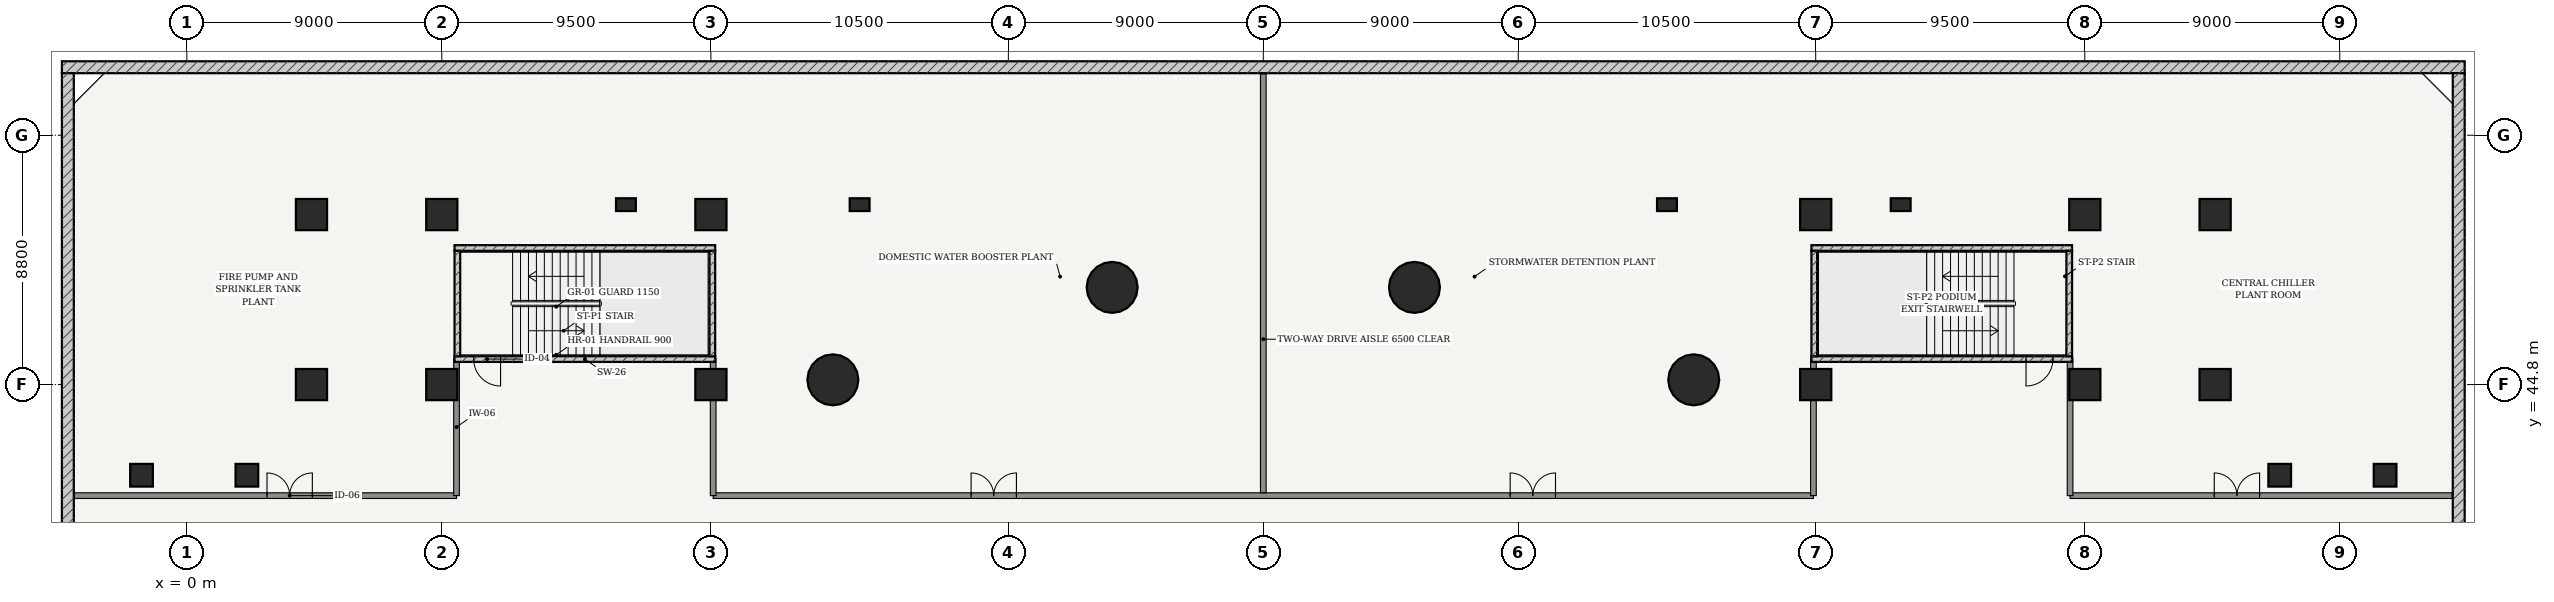
"""IFC4 building model, lengths in metres.
Left out: names, types, materials, properties, quantities, classifications, styles, units other than length and angle.
Written with IfcOpenShell. Run it as: python <this file> out.ifc"""

import sys

from ifc_helpers import new_model, si_unit, direction, frame, frame_2d, origin, origin_2d, place, context, subcontext, project, spatial, rectangle, hollow_circle, extrude, source, transform, mapped, element, fill, save


model = new_model("IFC4")
c1 = context("Model", 3, precision=1e-05, world=origin(), true_north=direction((-0.2419218956, 0.970295726276)))
c2 = subcontext(c1, "Body", "Model", "MODEL_VIEW")
j1 = project(units=[si_unit("LENGTHUNIT", "METRE"), si_unit("PLANEANGLEUNIT", "RADIAN")], contexts=[c1])
p1 = place(None, origin())
s1 = spatial("IfcSite", under=j1, at=p1, CompositionType="ELEMENT")
p2 = place(p1, origin())
s2 = spatial("IfcBuilding", under=s1, at=p2, CompositionType="ELEMENT")
p3 = place(p2, frame((0.0, 0.0, -8.4)))
s3 = spatial("IfcBuildingStorey", under=s2, at=p3, CompositionType="ELEMENT", Elevation=-8.4)
p4 = place(p3, frame((9.45, 45.7, 0.0), z_axis=(0.0, 0.0, 1.0), x_axis=(1.0, 0.0, 0.0)))
e1 = element("IfcWall", 1, at=p4, inside=s3, PredefinedType="SOLIDWALL", context=c2, shape_type="SweptSolid", body=[
    extrude(rectangle(XDim=9.2, YDim=0.2, at=frame_2d((4.6, 0.0))), origin(), (0.0, 0.0, 1.0), 3.88),
])
p5 = place(p4, frame((0.675, 0.0, 0.0)))
e2 = element("IfcOpeningElement", 2, at=p5, cuts=e1, PredefinedType="OPENING", context=c2, shape_type="SweptSolid", body=[
    extrude(rectangle(XDim=0.95, YDim=2.15, at=frame_2d((0.475, 1.075))), frame((0.0, 0.11, 0.0), z_axis=(0.0, -1.0, 0.0), x_axis=(1.0, 0.0, 0.0)), (0.0, 0.0, 1.0), 0.22),
])
p6 = place(p3, frame((9.45, 49.62, 0.0), z_axis=(0.0, 0.0, 1.0), x_axis=(1.0, 0.0, 0.0)))
e3 = element("IfcWall", 3, at=p6, inside=s3, PredefinedType="SOLIDWALL", context=c2, shape_type="SweptSolid", body=[
    extrude(rectangle(XDim=9.2, YDim=0.2, at=frame_2d((4.6, 0.0))), origin(), (0.0, 0.0, 1.0), 3.88),
])
for number, where, z_axis, x_axis in (
    (4, (9.55, 45.8, 0.0), (0.0, 0.0, 1.0), (0.0, 1.0, 0.0)),
    (5, (18.55, 45.8, 0.0), (0.0, 0.0, 1.0), (0.0, 1.0, 0.0)),
):
    element("IfcWall", number, at=place(p3, frame(where, z_axis=z_axis, x_axis=x_axis)), inside=s3, PredefinedType="SOLIDWALL", context=c2, shape_type="SweptSolid", body=[
        extrude(rectangle(XDim=3.72, YDim=0.2, at=frame_2d((1.86, 0.0))), origin(), (0.0, 0.0, 1.0), 3.88),
    ])
p7 = place(p3, frame((57.35, 45.7, 0.0), z_axis=(0.0, 0.0, 1.0), x_axis=(1.0, 0.0, 0.0)))
e6 = element("IfcWall", 6, at=p7, inside=s3, PredefinedType="SOLIDWALL", context=c2, shape_type="SweptSolid", body=[
    extrude(rectangle(XDim=9.2, YDim=0.2, at=frame_2d((4.6, 0.0))), origin(), (0.0, 0.0, 1.0), 3.88),
])
p8 = place(p7, frame((7.575, 0.0, 0.0)))
e7 = element("IfcOpeningElement", 7, at=p8, cuts=e6, PredefinedType="OPENING", context=c2, shape_type="SweptSolid", body=[
    extrude(rectangle(XDim=0.95, YDim=2.15, at=frame_2d((0.475, 1.075))), frame((0.0, 0.11, 0.0), z_axis=(0.0, -1.0, 0.0), x_axis=(1.0, 0.0, 0.0)), (0.0, 0.0, 1.0), 0.22),
])
p9 = place(p3, frame((57.35, 49.62, 0.0), z_axis=(0.0, 0.0, 1.0), x_axis=(1.0, 0.0, 0.0)))
e8 = element("IfcWall", 8, at=p9, inside=s3, PredefinedType="SOLIDWALL", context=c2, shape_type="SweptSolid", body=[
    extrude(rectangle(XDim=9.2, YDim=0.2, at=frame_2d((4.6, 0.0))), origin(), (0.0, 0.0, 1.0), 3.88),
])
for number, where, z_axis, x_axis in (
    (9, (57.45, 45.8, 0.0), (0.0, 0.0, 1.0), (0.0, 1.0, 0.0)),
    (10, (66.45, 45.8, 0.0), (0.0, 0.0, 1.0), (0.0, 1.0, 0.0)),
):
    element("IfcWall", number, at=place(p3, frame(where, z_axis=z_axis, x_axis=x_axis)), inside=s3, PredefinedType="SOLIDWALL", context=c2, shape_type="SweptSolid", body=[
        extrude(rectangle(XDim=3.72, YDim=0.2, at=frame_2d((1.86, 0.0))), origin(), (0.0, 0.0, 1.0), 3.88),
    ])
p10 = place(p3, frame((-4.41, 56.0, 0.0), z_axis=(0.0, 0.0, 1.0), x_axis=(1.0, 0.0, 0.0)))
e11 = element("IfcWall", 11, at=p10, inside=s3, PredefinedType="SOLIDWALL", context=c2, shape_type="SweptSolid", body=[
    extrude(rectangle(XDim=84.82, YDim=0.42, at=frame_2d((42.41, 0.0))), origin(), (0.0, 0.0, 1.0), 3.88),
])
for number, where, z_axis, x_axis in (
    (12, (-4.2, -2.19, 0.0), (0.0, 0.0, 1.0), (0.0, 1.0, 0.0)),
    (13, (80.2, -2.19, 0.0), (0.0, 0.0, 1.0), (0.0, 1.0, 0.0)),
):
    element("IfcWall", number, at=place(p3, frame(where, z_axis=z_axis, x_axis=x_axis)), inside=s3, PredefinedType="SOLIDWALL", context=c2, shape_type="SweptSolid", body=[
        extrude(rectangle(XDim=57.98, YDim=0.42, at=frame_2d((28.99, 0.0))), origin(), (0.0, 0.0, 1.0), 3.88),
    ])
for number, where, z_axis, x_axis in (
    (14, (53.195, 44.968, 0.0), (0.0, 0.0, 1.0), (1.0, 0.0, 0.0)),
    (15, (43.336, 48.23, 0.0), (0.0, 0.0, 1.0), (1.0, 0.0, 0.0)),
    (16, (32.664, 48.23, 0.0), (0.0, 0.0, 1.0), (1.0, 0.0, 0.0)),
    (17, (22.805, 44.968, 0.0), (0.0, 0.0, 1.0), (1.0, 0.0, 0.0)),
):
    element("IfcColumn", number, at=place(p3, frame(where, z_axis=z_axis, x_axis=x_axis)), inside=s3, PredefinedType="COLUMN", context=c2, shape_type="SweptSolid", body=[
        extrude(hollow_circle(Radius=0.9, WallThickness=0.055, at=origin_2d()), origin(), (0.0, 0.0, 1.0), 4.2),
    ])
for number, where, z_axis, x_axis in (
    (18, (4.4, 44.8, 0.0), (0.0, 0.0, 1.0), (1.0, 0.0, 0.0)),
    (19, (4.4, 50.8, 0.0), (0.0, 0.0, 1.0), (1.0, 0.0, 0.0)),
    (20, (9.0, 44.8, 0.0), (0.0, 0.0, 1.0), (1.0, 0.0, 0.0)),
    (21, (9.0, 50.8, 0.0), (0.0, 0.0, 1.0), (1.0, 0.0, 0.0)),
    (22, (18.5, 44.8, 0.0), (0.0, 0.0, 1.0), (1.0, 0.0, 0.0)),
    (23, (18.5, 50.8, 0.0), (0.0, 0.0, 1.0), (1.0, 0.0, 0.0)),
    (24, (57.5, 44.8, 0.0), (0.0, 0.0, 1.0), (1.0, 0.0, 0.0)),
    (25, (57.5, 50.8, 0.0), (0.0, 0.0, 1.0), (1.0, 0.0, 0.0)),
    (26, (67.0, 44.8, 0.0), (0.0, 0.0, 1.0), (1.0, 0.0, 0.0)),
    (27, (67.0, 50.8, 0.0), (0.0, 0.0, 1.0), (1.0, 0.0, 0.0)),
    (28, (71.6, 44.8, 0.0), (0.0, 0.0, 1.0), (1.0, 0.0, 0.0)),
    (29, (71.6, 50.8, 0.0), (0.0, 0.0, 1.0), (1.0, 0.0, 0.0)),
):
    element("IfcColumn", number, at=place(p3, frame(where, z_axis=z_axis, x_axis=x_axis)), inside=s3, PredefinedType="COLUMN", context=c2, shape_type="SweptSolid", body=[
        extrude(rectangle(XDim=1.1, YDim=1.1, at=origin_2d()), origin(), (0.0, 0.0, 1.0), 4.2),
    ])
for number, where, z_axis, x_axis in (
    (30, (15.5, 51.15, 0.0), (0.0, 0.0, 1.0), (1.0, 0.0, 0.0)),
    (31, (23.75, 51.15, 0.0), (0.0, 0.0, 1.0), (1.0, 0.0, 0.0)),
    (32, (52.25, 51.15, 0.0), (0.0, 0.0, 1.0), (1.0, 0.0, 0.0)),
    (33, (60.5, 51.15, 0.0), (0.0, 0.0, 1.0), (1.0, 0.0, 0.0)),
):
    element("IfcColumn", number, at=place(p3, frame(where, z_axis=z_axis, x_axis=x_axis)), inside=s3, PredefinedType="PILASTER", context=c2, shape_type="SweptSolid", body=[
        extrude(rectangle(XDim=0.7, YDim=0.45, at=origin_2d()), origin(), (0.0, 0.0, 1.0), 4.2),
    ])
for number, where, z_axis, x_axis in (
    (34, (-1.6, 41.6, 0.0), (0.0, 0.0, 1.0), (1.0, 0.0, 0.0)),
    (35, (2.12, 41.6, 0.0), (0.0, 0.0, 1.0), (1.0, 0.0, 0.0)),
    (36, (73.88, 41.6, 0.0), (0.0, 0.0, 1.0), (1.0, 0.0, 0.0)),
    (37, (77.6, 41.6, 0.0), (0.0, 0.0, 1.0), (1.0, 0.0, 0.0)),
):
    element("IfcColumn", number, at=place(p3, frame(where, z_axis=z_axis, x_axis=x_axis)), inside=s3, PredefinedType="COLUMN", context=c2, shape_type="SweptSolid", body=[
        extrude(rectangle(XDim=0.8, YDim=0.8, at=origin_2d()), origin(), (0.0, 0.0, 1.0), 4.2),
    ])
p11 = place(p3, frame((-3.97, 40.88, 0.0), z_axis=(0.0, 0.0, 1.0), x_axis=(1.0, 0.0, 0.0)))
e38 = element("IfcWall", 38, at=p11, inside=s3, PredefinedType="PARTITIONING", context=c2, shape_type="SweptSolid", body=[
    extrude(rectangle(XDim=13.49, YDim=0.2, at=frame_2d((6.745, 0.0))), origin(), (0.0, 0.0, 1.0), 2.915),
])
p12 = place(p11, frame((6.8, 0.0, 0.0)))
e39 = element("IfcOpeningElement", 39, at=p12, cuts=e38, PredefinedType="OPENING", context=c2, shape_type="SweptSolid", body=[
    extrude(rectangle(XDim=1.6, YDim=2.25, at=frame_2d((0.8, 1.125))), frame((0.0, 0.11, 0.0), z_axis=(0.0, -1.0, 0.0), x_axis=(1.0, 0.0, 0.0)), (0.0, 0.0, 1.0), 0.22),
])
p13 = place(p3, frame((9.52, 40.88, 0.0), z_axis=(0.0, 0.0, 1.0), x_axis=(0.0, 1.0, 0.0)))
e40 = element("IfcWall", 40, at=p13, inside=s3, PredefinedType="PARTITIONING", context=c2, shape_type="SweptSolid", body=[
    extrude(rectangle(XDim=4.84, YDim=0.2, at=frame_2d((2.42, 0.0))), origin(), (0.0, 0.0, 1.0), 3.015),
])
p14 = place(p3, frame((18.58, 40.88, 0.0), z_axis=(0.0, 0.0, 1.0), x_axis=(1.0, 0.0, 0.0)))
e41 = element("IfcWall", 41, at=p14, inside=s3, PredefinedType="PARTITIONING", context=c2, shape_type="SweptSolid", body=[
    extrude(rectangle(XDim=38.84, YDim=0.2, at=frame_2d((19.42, 0.0))), origin(), (0.0, 0.0, 1.0), 3.23),
])
p15 = place(p14, frame((9.105, 0.0, 0.0)))
e42 = element("IfcOpeningElement", 42, at=p15, cuts=e41, PredefinedType="OPENING", context=c2, shape_type="SweptSolid", body=[
    extrude(rectangle(XDim=1.6, YDim=2.25, at=frame_2d((0.8, 1.125))), frame((0.0, 0.11, 0.0), z_axis=(0.0, -1.0, 0.0), x_axis=(1.0, 0.0, 0.0)), (0.0, 0.0, 1.0), 0.22),
])
p16 = place(p14, frame((28.135, 0.0, 0.0)))
e43 = element("IfcOpeningElement", 43, at=p16, cuts=e41, PredefinedType="OPENING", context=c2, shape_type="SweptSolid", body=[
    extrude(rectangle(XDim=1.6, YDim=2.25, at=frame_2d((0.8, 1.125))), frame((0.0, 0.11, 0.0), z_axis=(0.0, -1.0, 0.0), x_axis=(1.0, 0.0, 0.0)), (0.0, 0.0, 1.0), 0.22),
])
for number, where, z_axis, x_axis in (
    (44, (18.58, 40.88, 0.0), (0.0, 0.0, 1.0), (0.0, 1.0, 0.0)),
    (45, (57.42, 40.88, 0.0), (0.0, 0.0, 1.0), (0.0, 1.0, 0.0)),
):
    element("IfcWall", number, at=place(p3, frame(where, z_axis=z_axis, x_axis=x_axis)), inside=s3, PredefinedType="PARTITIONING", context=c2, shape_type="SweptSolid", body=[
        extrude(rectangle(XDim=4.84, YDim=0.2, at=frame_2d((2.42, 0.0))), origin(), (0.0, 0.0, 1.0), 3.015),
    ])
p17 = place(p3, frame((66.48, 40.88, 0.0), z_axis=(0.0, 0.0, 1.0), x_axis=(1.0, 0.0, 0.0)))
e46 = element("IfcWall", 46, at=p17, inside=s3, PredefinedType="PARTITIONING", context=c2, shape_type="SweptSolid", body=[
    extrude(rectangle(XDim=13.49, YDim=0.2, at=frame_2d((6.745, 0.0))), origin(), (0.0, 0.0, 1.0), 2.915),
])
p18 = place(p17, frame((5.09, 0.0, 0.0)))
e47 = element("IfcOpeningElement", 47, at=p18, cuts=e46, PredefinedType="OPENING", context=c2, shape_type="SweptSolid", body=[
    extrude(rectangle(XDim=1.6, YDim=2.25, at=frame_2d((0.8, 1.125))), frame((0.0, 0.11, 0.0), z_axis=(0.0, -1.0, 0.0), x_axis=(1.0, 0.0, 0.0)), (0.0, 0.0, 1.0), 0.22),
])
p19 = place(p3, frame((66.48, 40.88, 0.0), z_axis=(0.0, 0.0, 1.0), x_axis=(0.0, 1.0, 0.0)))
e48 = element("IfcWall", 48, at=p19, inside=s3, PredefinedType="PARTITIONING", context=c2, shape_type="SweptSolid", body=[
    extrude(rectangle(XDim=4.84, YDim=0.2, at=frame_2d((2.42, 0.0))), origin(), (0.0, 0.0, 1.0), 3.015),
])
p20 = place(p3, frame((38.0, 40.982, 0.0), z_axis=(0.0, 0.0, 1.0), x_axis=(0.0, 1.0, 0.0)))
e49 = element("IfcWall", 49, at=p20, inside=s3, PredefinedType="PARTITIONING", context=c2, shape_type="SweptSolid", body=[
    extrude(rectangle(XDim=14.788, YDim=0.2, at=frame_2d((7.394, 0.0))), origin(), (0.0, 0.0, 1.0), 3.322),
])
m1 = source(origin(), c2, "Body", "SweptSolid", [
    extrude(rectangle(XDim=0.95, YDim=2.15, at=frame_2d((0.475, 1.075))), frame((0.0, 0.025, 0.0), z_axis=(0.0, -1.0, 0.0), x_axis=(1.0, 0.0, 0.0)), (0.0, 0.0, 1.0), 0.05),
])
p21 = place(p5, frame((0.95, 0.0, 0.0), z_axis=(0.0, 0.0, 1.0), x_axis=(-1.0, 0.0, 0.0)))
e50 = element("IfcDoor", 50, at=p21, inside=s3, OperationType="SINGLE_SWING_LEFT", PredefinedType="DOOR", context=c2, shape_type="MappedRepresentation", body=[
    mapped(m1, transform((0.0, 0.0, 0.0), scale=1.0)),
])
fill(e2, e50)
p22 = place(p8, frame((0.95, 0.0, 0.0), z_axis=(0.0, 0.0, 1.0), x_axis=(-1.0, 0.0, 0.0)))
e51 = element("IfcDoor", 51, at=p22, inside=s3, OperationType="SINGLE_SWING_RIGHT", PredefinedType="DOOR", context=c2, shape_type="MappedRepresentation", body=[
    mapped(m1, transform((0.0, 0.0, 0.0), scale=1.0)),
])
fill(e7, e51)
m2 = source(origin(), c2, "Body", "SweptSolid", [
    extrude(rectangle(XDim=1.6, YDim=2.25, at=frame_2d((0.8, 1.125))), frame((0.0, 0.025, 0.0), z_axis=(0.0, -1.0, 0.0), x_axis=(1.0, 0.0, 0.0)), (0.0, 0.0, 1.0), 0.05),
])
p23 = place(p12, origin())
e52 = element("IfcDoor", 52, at=p23, inside=s3, OperationType="DOUBLE_DOOR_SINGLE_SWING", PredefinedType="DOOR", context=c2, shape_type="MappedRepresentation", body=[
    mapped(m2, transform((0.0, 0.0, 0.0), scale=1.0)),
])
fill(e39, e52)
p24 = place(p15, origin())
e53 = element("IfcDoor", 53, at=p24, inside=s3, OperationType="DOUBLE_DOOR_SINGLE_SWING", PredefinedType="DOOR", context=c2, shape_type="MappedRepresentation", body=[
    mapped(m2, transform((0.0, 0.0, 0.0), scale=1.0)),
])
fill(e42, e53)
p25 = place(p16, origin())
e54 = element("IfcDoor", 54, at=p25, inside=s3, OperationType="DOUBLE_DOOR_SINGLE_SWING", PredefinedType="DOOR", context=c2, shape_type="MappedRepresentation", body=[
    mapped(m2, transform((0.0, 0.0, 0.0), scale=1.0)),
])
fill(e43, e54)
p26 = place(p18, origin())
e55 = element("IfcDoor", 55, at=p26, inside=s3, OperationType="DOUBLE_DOOR_SINGLE_SWING", PredefinedType="DOOR", context=c2, shape_type="MappedRepresentation", body=[
    mapped(m2, transform((0.0, 0.0, 0.0), scale=1.0)),
])
fill(e47, e55)
save(model, sys.argv[1])
